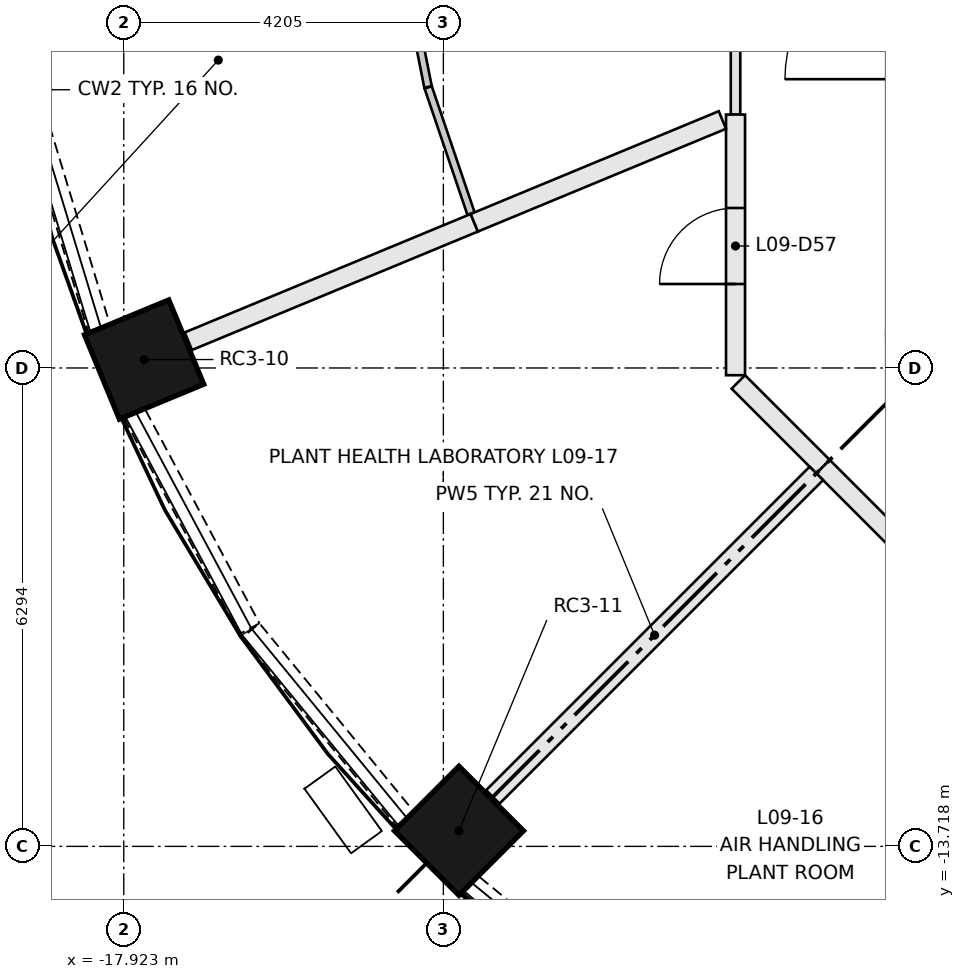
"""IFC4 building model, lengths in metres.
Left out: names, types, materials, properties, quantities, classifications, styles, units other than length and angle.
Written with IfcOpenShell. Run it as: python <this file> out.ifc"""

import sys

from ifc_helpers import new_model, si_unit, direction, frame, frame_2d, origin, origin_2d, place, context, subcontext, project, spatial, rectangle, extrude, element, fill, save


model = new_model("IFC4")
c1 = context("Model", 3, precision=1e-05, world=origin(), true_north=direction((0.0, 1.0)))
c2 = subcontext(c1, "Body", "Model", "MODEL_VIEW")
j1 = project(units=[si_unit("LENGTHUNIT", "METRE"), si_unit("PLANEANGLEUNIT", "RADIAN")], contexts=[c1])
p1 = place(None, origin())
s1 = spatial("IfcSite", under=j1, at=p1, CompositionType="ELEMENT")
p2 = place(p1, origin())
s2 = spatial("IfcBuilding", under=s1, at=p2, CompositionType="ELEMENT")
p3 = place(p2, frame((0.0, 0.0, 37.15)))
s3 = spatial("IfcBuildingStorey", under=s2, at=p3, CompositionType="ELEMENT", Elevation=37.15)
for number, where, z_axis, x_axis in (
    (1, (-17.655, -7.313, 0.0), (0.0, 0.0, 1.0), (-0.924, -0.383, 0.0)),
    (2, (-13.513, -13.513, 0.0), (0.0, 0.0, 1.0), (-0.707, -0.707, 0.0)),
):
    element("IfcColumn", number, at=place(p3, frame(where, z_axis=z_axis, x_axis=x_axis)), inside=s3, PredefinedType="COLUMN", context=c2, shape_type="SweptSolid", body=[
        extrude(rectangle(XDim=1.2, YDim=1.2, at=origin_2d()), origin(), (0.0, 0.0, 1.0), 3.65),
    ])
p4 = place(p3, frame((-19.18, -3.83, 0.0), z_axis=(0.0, 0.0, 1.0), x_axis=(0.290472877795, -0.956883225512, 0.0)))
e3 = element("IfcWall", 3, at=p4, inside=s3, PredefinedType="SOLIDWALL", context=c2, shape_type="SweptSolid", body=[
    extrude(rectangle(XDim=3.202, YDim=0.3, at=frame_2d((1.601, 0.0))), origin(), (0.0, 0.0, 1.0), 0.9),
])
p5 = place(p3, frame((-17.78, -8.028, 0.0), z_axis=(0.0, 0.0, 1.0), x_axis=(0.471284265614, -0.881981372243, 0.0)))
e4 = element("IfcWall", 4, at=p5, inside=s3, PredefinedType="SOLIDWALL", context=c2, shape_type="SweptSolid", body=[
    extrude(rectangle(XDim=3.204, YDim=0.3, at=frame_2d((1.602, 0.0))), origin(), (0.0, 0.0, 1.0), 0.9),
])
for number, where, z_axis, x_axis in (
    (5, (-16.253, -10.879, 0.0), (0.0, 0.0, 1.0), (0.634, -0.773, 0.0)),
    (6, (-13.354, -14.222, 0.0), (0.0, 0.0, 1.0), (0.773, -0.634, 0.0)),
):
    element("IfcWall", number, at=place(p3, frame(where, z_axis=z_axis, x_axis=x_axis)), inside=s3, PredefinedType="SOLIDWALL", context=c2, shape_type="SweptSolid", body=[
        extrude(rectangle(XDim=3.202, YDim=0.3, at=frame_2d((1.601, 0.0))), origin(), (0.0, 0.0, 1.0), 0.9),
    ])
p6 = place(p3, frame((-9.874, -4.09, 0.0), z_axis=(0.0, 0.0, 1.0), x_axis=(0.0, 1.0, 0.0)))
e7 = element("IfcWall", 7, at=p6, inside=s3, PredefinedType="PARTITIONING", context=c2, shape_type="SweptSolid", body=[
    extrude(rectangle(XDim=8.18, YDim=0.125, at=frame_2d((4.09, 0.0))), origin(), (0.0, 0.0, 1.0), 3.3),
])
p7 = place(p6, frame((3.6, 0.0, 0.0)))
e8 = element("IfcOpeningElement", 8, at=p7, cuts=e7, PredefinedType="OPENING", context=c2, shape_type="SweptSolid", body=[
    extrude(rectangle(XDim=1.0, YDim=2.1, at=frame_2d((0.5, 1.05))), frame((0.0, 0.073, 0.0), z_axis=(0.0, -1.0, 0.0), x_axis=(1.0, 0.0, 0.0)), (0.0, 0.0, 1.0), 0.145),
])
p8 = place(p3, frame((-9.874, -7.519, 0.0), z_axis=(0.0, 0.0, 1.0), x_axis=(0.0, 1.0, 0.0)))
e9 = element("IfcWall", 9, at=p8, inside=s3, PredefinedType="PARTITIONING", context=c2, shape_type="SweptSolid", body=[
    extrude(rectangle(XDim=3.429, YDim=0.25, at=frame_2d((1.715, 0.0))), origin(), (0.0, 0.0, 1.0), 3.3),
])
p9 = place(p8, frame((1.2, 0.0, 0.0)))
e10 = element("IfcOpeningElement", 10, at=p9, cuts=e9, PredefinedType="OPENING", context=c2, shape_type="SweptSolid", body=[
    extrude(rectangle(XDim=1.0, YDim=2.1, at=frame_2d((0.5, 1.05))), frame((0.0, 0.135, 0.0), z_axis=(0.0, -1.0, 0.0), x_axis=(1.0, 0.0, 0.0)), (0.0, 0.0, 1.0), 0.27),
])
for number, where, z_axis, x_axis in (
    (11, (-8.722, -8.722, 0.0), (0.0, 0.0, 1.0), (-0.707, 0.707, 0.0)),
    (12, (-7.608, -9.837, 0.0), (0.0, 0.0, 1.0), (-0.707, 0.707, 0.0)),
):
    element("IfcWall", number, at=place(p3, frame(where, z_axis=z_axis, x_axis=x_axis)), inside=s3, PredefinedType="PARTITIONING", context=c2, shape_type="SweptSolid", body=[
        extrude(rectangle(XDim=1.577, YDim=0.25, at=frame_2d((0.788, 0.0))), origin(), (0.0, 0.0, 1.0), 3.3),
    ])
p10 = place(p3, frame((-13.92, -3.726, 0.0), z_axis=(0.0, 0.0, 1.0), x_axis=(-0.195091231684, 0.980785099459, 0.0)))
e13 = element("IfcWall", 13, at=p10, inside=s3, PredefinedType="PARTITIONING", context=c2, shape_type="SweptSolid", body=[
    extrude(rectangle(XDim=1.878, YDim=0.1, at=frame_2d((0.939, 0.0))), origin(), (0.0, 0.0, 1.0), 3.3),
])
p11 = place(p3, frame((-13.354, -5.393, 0.0), z_axis=(0.0, 0.0, 1.0), x_axis=(-0.321445771201, 0.946927988908, 0.0)))
e14 = element("IfcWall", 14, at=p11, inside=s3, PredefinedType="PARTITIONING", context=c2, shape_type="SweptSolid", body=[
    extrude(rectangle(XDim=1.753, YDim=0.1, at=frame_2d((0.876, 0.0))), origin(), (0.0, 0.0, 1.0), 3.3),
])
p12 = place(p3, frame((-10.047, -4.162, 0.0), z_axis=(0.0, 0.0, 1.0), x_axis=(-0.92388805455, -0.382662857696, 0.0)))
e15 = element("IfcWall", 15, at=p12, inside=s3, PredefinedType="PARTITIONING", context=c2, shape_type="SweptSolid", body=[
    extrude(rectangle(XDim=3.535, YDim=0.25, at=frame_2d((1.768, 0.0))), origin(), (0.0, 0.0, 1.0), 3.3),
])
p13 = place(p3, frame((-13.313, -5.514, 0.0), z_axis=(0.0, 0.0, 1.0), x_axis=(-0.923873536763, -0.382697907061, 0.0)))
e16 = element("IfcWall", 16, at=p13, inside=s3, PredefinedType="PARTITIONING", context=c2, shape_type="SweptSolid", body=[
    extrude(rectangle(XDim=4.07, YDim=0.25, at=frame_2d((2.035, 0.0))), origin(), (0.0, 0.0, 1.0), 3.3),
])
p14 = place(p3, frame((-13.067, -13.067, 0.0), z_axis=(0.0, 0.0, 1.0), x_axis=(0.707106781187, 0.707106781187, 0.0)))
e17 = element("IfcWall", 17, at=p14, inside=s3, PredefinedType="PARTITIONING", context=c2, shape_type="SweptSolid", body=[
    extrude(rectangle(XDim=6.02, YDim=0.25, at=frame_2d((3.01, 0.0))), origin(), (0.0, 0.0, 1.0), 3.3),
])
p15 = place(p9, origin())
e18 = element("IfcDoor", 18, at=p15, inside=s3, OperationType="SINGLE_SWING_LEFT", PredefinedType="DOOR", context=c2, shape_type="SweptSolid", body=[
    extrude(rectangle(XDim=1.0, YDim=2.1, at=frame_2d((0.5, 1.05))), frame((0.0, 0.025, 0.0), z_axis=(0.0, -1.0, 0.0), x_axis=(1.0, 0.0, 0.0)), (0.0, 0.0, 1.0), 0.05),
])
fill(e10, e18)
save(model, sys.argv[1])
